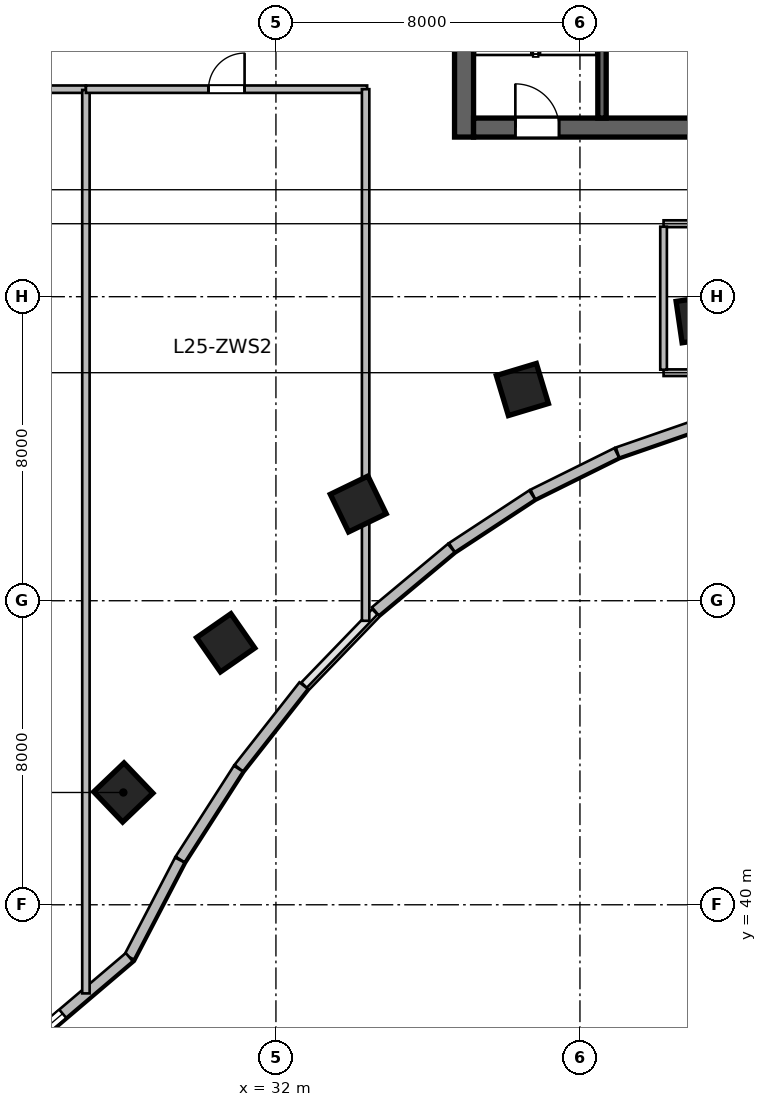
"""IFC4 building model, lengths in metres.
Left out: names, types, materials, properties, quantities, classifications, styles, units other than length and angle.
Written with IfcOpenShell. Run it as: python <this file> out.ifc"""

import sys

from ifc_helpers import new_model, si_unit, direction, frame, frame_2d, origin, origin_2d, place, context, subcontext, project, spatial, rectangle, extrude, source, transform, mapped, element, fill, save


model = new_model("IFC4")
c1 = context("Model", 3, precision=1e-05, world=origin(), true_north=direction((0.0, 1.0)))
c2 = subcontext(c1, "Body", "Model", "MODEL_VIEW")
j1 = project(units=[si_unit("LENGTHUNIT", "METRE"), si_unit("PLANEANGLEUNIT", "RADIAN")], contexts=[c1])
p1 = place(None, origin())
s1 = spatial("IfcSite", under=j1, at=p1, CompositionType="ELEMENT")
p2 = place(p1, origin())
s2 = spatial("IfcBuilding", under=s1, at=p2, CompositionType="ELEMENT")
p3 = place(p2, frame((0.0, 0.0, 107.7)))
s3 = spatial("IfcBuildingStorey", under=s2, at=p3, CompositionType="ELEMENT", Elevation=107.7)
m1 = source(origin(), c2, "Body", "SweptSolid", [
    extrude(rectangle(XDim=12.0, YDim=0.5, at=frame_2d((6.0, 0.0))), origin(), (0.0, 0.0, 1.0), 3.9),
])
p4 = place(p3, frame((36.95, 60.2, 0.0), z_axis=(0.0, 0.0, 1.0), x_axis=(0.0, 1.0, 0.0)))
e1 = element("IfcWall", 1, at=p4, inside=s3, PredefinedType="SHEAR", context=c2, shape_type="MappedRepresentation", body=[
    mapped(m1, transform((0.0, 0.0, 0.0), scale=1.0)),
])
m2 = source(origin(), c2, "Body", "SweptSolid", [
    extrude(rectangle(XDim=21.6, YDim=0.5, at=frame_2d((10.8, 0.0))), origin(), (0.0, 0.0, 1.0), 3.9),
])
p5 = place(p3, frame((37.2, 60.45, 0.0), z_axis=(0.0, 0.0, 1.0), x_axis=(1.0, 0.0, 0.0)))
e2 = element("IfcWall", 2, at=p5, inside=s3, PredefinedType="SHEAR", context=c2, shape_type="MappedRepresentation", body=[
    mapped(m2, transform((0.0, 0.0, 0.0), scale=1.0)),
])
p6 = place(p5, frame((1.1, 0.0, 0.0)))
e3 = element("IfcOpeningElement", 3, at=p6, cuts=e2, PredefinedType="OPENING", context=c2, shape_type="SweptSolid", body=[
    extrude(rectangle(XDim=1.15, YDim=2.15, at=frame_2d((0.575, 1.075))), frame((0.0, 0.26, 0.0), z_axis=(0.0, -1.0, 0.0), x_axis=(1.0, 0.0, 0.0)), (0.0, 0.0, 1.0), 0.52),
])
p7 = place(p5, frame((19.5, 0.0, 0.0)))
e4 = element("IfcOpeningElement", 4, at=p7, cuts=e2, PredefinedType="OPENING", context=c2, shape_type="SweptSolid", body=[
    extrude(rectangle(XDim=0.9, YDim=2.1, at=frame_2d((0.45, 1.05))), frame((0.0, 0.26, 0.0), z_axis=(0.0, -1.0, 0.0), x_axis=(1.0, 0.0, 0.0)), (0.0, 0.0, 1.0), 0.52),
])
p8 = place(p5, frame((12.02, 0.0, 0.0)))
e5 = element("IfcOpeningElement", 5, at=p8, cuts=e2, PredefinedType="OPENING", context=c2, shape_type="SweptSolid", body=[
    extrude(rectangle(XDim=1.6, YDim=2.15, at=frame_2d((0.8, 1.075))), frame((0.0, 0.26, 0.0), z_axis=(0.0, -1.0, 0.0), x_axis=(1.0, 0.0, 0.0)), (0.0, 0.0, 1.0), 0.52),
])
m3 = source(origin(), c2, "Body", "SweptSolid", [
    extrude(rectangle(XDim=11.0, YDim=0.22, at=frame_2d((5.5, 0.0))), origin(), (0.0, 0.0, 1.0), 3.9),
])
p9 = place(p3, frame((40.58, 60.7, 0.0), z_axis=(0.0, 0.0, 1.0), x_axis=(0.0, 1.0, 0.0)))
e6 = element("IfcWall", 6, at=p9, inside=s3, PredefinedType="SHEAR", context=c2, shape_type="MappedRepresentation", body=[
    mapped(m3, transform((0.0, 0.0, 0.0), scale=1.0)),
])
m4 = source(origin(), c2, "Body", "SweptSolid", [
    extrude(rectangle(XDim=1.1, YDim=1.1, at=origin_2d()), origin(), (0.0, 0.0, 1.0), 3.9),
])
for number, where, z_axis, x_axis in (
    (7, (27.985, 42.955, 0.0), (0.0, 0.0, 1.0), (-0.691, 0.723, 0.0)),
    (8, (30.677, 46.892, 0.0), (0.0, 0.0, 1.0), (-0.571, 0.821, 0.0)),
    (9, (34.166, 50.545, 0.0), (0.0, 0.0, 1.0), (-0.436, 0.9, 0.0)),
    (10, (38.485, 53.558, 0.0), (0.0, 0.0, 1.0), (-0.289, 0.957, 0.0)),
    (11, (43.154, 55.411, 0.0), (0.0, 0.0, 1.0), (-0.143, 0.99, 0.0)),
):
    element("IfcColumn", number, at=place(p3, frame(where, z_axis=z_axis, x_axis=x_axis)), inside=s3, PredefinedType="COLUMN", context=c2, shape_type="MappedRepresentation", body=[
        mapped(m4, transform((0.0, 0.0, 0.0), scale=1.0)),
    ])
m5 = source(origin(), c2, "Body", "SweptSolid", [
    extrude(rectangle(XDim=2.411, YDim=0.28, at=frame_2d((1.205, 0.0))), origin(), (0.0, 0.0, 1.0), 3.65),
])
p10 = place(p3, frame((43.266, 52.689, 0.0), z_axis=(0.0, 0.0, 1.0), x_axis=(-0.944880068161, -0.327416640982, 0.0)))
e12 = element("IfcWall", 12, at=p10, inside=s3, PredefinedType="SOLIDWALL", context=c2, shape_type="MappedRepresentation", body=[
    mapped(m5, transform((0.0, 0.0, 0.0), scale=1.0)),
])
m6 = source(origin(), c2, "Body", "SweptSolid", [
    extrude(rectangle(XDim=2.462, YDim=0.28, at=frame_2d((1.231, 0.0))), origin(), (0.0, 0.0, 1.0), 3.65),
])
p11 = place(p3, frame((40.967, 51.891, 0.0), z_axis=(0.0, 0.0, 1.0), x_axis=(-0.8959882207, -0.444077817917, 0.0)))
e13 = element("IfcWall", 13, at=p11, inside=s3, PredefinedType="SOLIDWALL", context=c2, shape_type="MappedRepresentation", body=[
    mapped(m6, transform((0.0, 0.0, 0.0), scale=1.0)),
])
m7 = source(origin(), c2, "Body", "SweptSolid", [
    extrude(rectangle(XDim=2.527, YDim=0.28, at=frame_2d((1.264, 0.0))), origin(), (0.0, 0.0, 1.0), 3.65),
])
p12 = place(p3, frame((38.742, 50.786, 0.0), z_axis=(0.0, 0.0, 1.0), x_axis=(-0.836011905051, -0.548711303523, 0.0)))
e14 = element("IfcWall", 14, at=p12, inside=s3, PredefinedType="SOLIDWALL", context=c2, shape_type="MappedRepresentation", body=[
    mapped(m7, transform((0.0, 0.0, 0.0), scale=1.0)),
])
m8 = source(origin(), c2, "Body", "SweptSolid", [
    extrude(rectangle(XDim=2.601, YDim=0.28, at=frame_2d((1.3, 0.0))), origin(), (0.0, 0.0, 1.0), 3.65),
])
p13 = place(p3, frame((36.613, 49.387, 0.0), z_axis=(0.0, 0.0, 1.0), x_axis=(-0.76796730295, -0.640489048775, 0.0)))
e15 = element("IfcWall", 15, at=p13, inside=s3, PredefinedType="SOLIDWALL", context=c2, shape_type="MappedRepresentation", body=[
    mapped(m8, transform((0.0, 0.0, 0.0), scale=1.0)),
])
m9 = source(origin(), c2, "Body", "SweptSolid", [
    extrude(rectangle(XDim=2.76, YDim=0.28, at=frame_2d((1.38, 0.0))), origin(), (0.0, 0.0, 1.0), 3.65),
])
p14 = place(p3, frame((32.728, 45.766, 0.0), z_axis=(0.0, 0.0, 1.0), x_axis=(-0.618180818641, -0.786035925047, 0.0)))
e16 = element("IfcWall", 16, at=p14, inside=s3, PredefinedType="SOLIDWALL", context=c2, shape_type="MappedRepresentation", body=[
    mapped(m9, transform((0.0, 0.0, 0.0), scale=1.0)),
])
m10 = source(origin(), c2, "Body", "SweptSolid", [
    extrude(rectangle(XDim=2.84, YDim=0.28, at=frame_2d((1.42, 0.0))), origin(), (0.0, 0.0, 1.0), 3.65),
])
p15 = place(p3, frame((31.011, 43.582, 0.0), z_axis=(0.0, 0.0, 1.0), x_axis=(-0.540214368057, -0.841527442538, 0.0)))
e17 = element("IfcWall", 17, at=p15, inside=s3, PredefinedType="SOLIDWALL", context=c2, shape_type="MappedRepresentation", body=[
    mapped(m10, transform((0.0, 0.0, 0.0), scale=1.0)),
])
m11 = source(origin(), c2, "Body", "SweptSolid", [
    extrude(rectangle(XDim=2.88, YDim=0.28, at=frame_2d((1.44, 0.0))), origin(), (0.0, 0.0, 1.0), 3.65),
])
p16 = place(p3, frame((29.469, 41.178, 0.0), z_axis=(0.0, 0.0, 1.0), x_axis=(-0.461769086658, -0.887000175088, 0.0)))
e18 = element("IfcWall", 18, at=p16, inside=s3, PredefinedType="SOLIDWALL", context=c2, shape_type="MappedRepresentation", body=[
    mapped(m11, transform((0.0, 0.0, 0.0), scale=1.0)),
])
m12 = source(origin(), c2, "Body", "SweptSolid", [
    extrude(rectangle(XDim=4.659, YDim=0.28, at=frame_2d((2.33, 0.0))), origin(), (0.0, 0.0, 1.0), 3.65),
])
p17 = place(p3, frame((28.139, 38.624, 0.0), z_axis=(0.0, 0.0, 1.0), x_axis=(-0.761913458795, -0.647678841176, 0.0)))
e19 = element("IfcWall", 19, at=p17, inside=s3, PredefinedType="SOLIDWALL", context=c2, shape_type="MappedRepresentation", body=[
    mapped(m12, transform((0.0, 0.0, 0.0), scale=1.0)),
])
p18 = place(p17, frame((2.299, 0.0, 0.95)))
e20 = element("IfcOpeningElement", 20, at=p18, cuts=e19, PredefinedType="OPENING", context=c2, shape_type="SweptSolid", body=[
    extrude(rectangle(XDim=2.2, YDim=2.1, at=frame_2d((1.1, 1.05))), frame((0.0, 0.15, 0.0), z_axis=(0.0, -1.0, 0.0), x_axis=(1.0, 0.0, 0.0)), (0.0, 0.0, 1.0), 0.3),
])
m13 = source(origin(), c2, "Body", "SweptSolid", [
    extrude(rectangle(XDim=4.176, YDim=0.175, at=frame_2d((2.088, 0.0))), origin(), (0.0, 0.0, 1.0), 3.65),
])
p19 = place(p3, frame((42.2, 54.0, 0.0), z_axis=(0.0, 0.0, 1.0), x_axis=(1.0, 0.0, 0.0)))
e21 = element("IfcWall", 21, at=p19, inside=s3, PredefinedType="PARTITIONING", context=c2, shape_type="MappedRepresentation", body=[
    mapped(m13, transform((0.0, 0.0, 0.0), scale=1.0)),
])
m14 = source(origin(), c2, "Body", "SweptSolid", [
    extrude(rectangle(XDim=4.176, YDim=0.18, at=frame_2d((2.088, 0.0))), origin(), (0.0, 0.0, 1.0), 3.65),
])
p20 = place(p3, frame((42.2, 57.92, 0.0), z_axis=(0.0, 0.0, 1.0), x_axis=(1.0, 0.0, 0.0)))
e22 = element("IfcWall", 22, at=p20, inside=s3, PredefinedType="PLUMBINGWALL", context=c2, shape_type="MappedRepresentation", body=[
    mapped(m14, transform((0.0, 0.0, 0.0), scale=1.0)),
])
p21 = place(p20, frame((1.638, 0.0, 0.0)))
e23 = element("IfcOpeningElement", 23, at=p21, cuts=e22, PredefinedType="OPENING", context=c2, shape_type="SweptSolid", body=[
    extrude(rectangle(XDim=0.9, YDim=2.08, at=frame_2d((0.45, 1.04))), frame((0.0, 0.1, 0.0), z_axis=(0.0, -1.0, 0.0), x_axis=(1.0, 0.0, 0.0)), (0.0, 0.0, 1.0), 0.2),
])
m15 = source(origin(), c2, "Body", "SweptSolid", [
    extrude(rectangle(XDim=3.763, YDim=0.175, at=frame_2d((1.881, 0.0))), origin(), (0.0, 0.0, 1.0), 3.65),
])
p22 = place(p3, frame((42.2, 54.079, 0.0), z_axis=(0.0, 0.0, 1.0), x_axis=(0.0, 1.0, 0.0)))
e24 = element("IfcWall", 24, at=p22, inside=s3, PredefinedType="PARTITIONING", context=c2, shape_type="MappedRepresentation", body=[
    mapped(m15, transform((0.0, 0.0, 0.0), scale=1.0)),
])
m16 = source(origin(), c2, "Body", "SweptSolid", [
    extrude(rectangle(XDim=3.82, YDim=0.195, at=frame_2d((1.91, 0.0))), origin(), (0.0, 0.0, 1.0), 3.65),
])
p23 = place(p3, frame((23.18, 61.46, 0.0), z_axis=(0.0, 0.0, 1.0), x_axis=(1.0, 0.0, 0.0)))
e25 = element("IfcWall", 25, at=p23, inside=s3, PredefinedType="PARTITIONING", context=c2, shape_type="MappedRepresentation", body=[
    mapped(m16, transform((0.0, 0.0, 0.0), scale=1.0)),
])
p24 = place(p23, frame((1.435, 0.0, 0.0)))
e26 = element("IfcOpeningElement", 26, at=p24, cuts=e25, PredefinedType="OPENING", context=c2, shape_type="SweptSolid", body=[
    extrude(rectangle(XDim=0.95, YDim=2.1, at=frame_2d((0.475, 1.05))), frame((0.0, 0.107, 0.0), z_axis=(0.0, -1.0, 0.0), x_axis=(1.0, 0.0, 0.0)), (0.0, 0.0, 1.0), 0.215),
])
m17 = source(origin(), c2, "Body", "SweptSolid", [
    extrude(rectangle(XDim=23.771, YDim=0.195, at=frame_2d((11.886, 0.0))), origin(), (0.0, 0.0, 1.0), 2.942),
])
p25 = place(p3, frame((27.0, 37.668, 0.0), z_axis=(0.0, 0.0, 1.0), x_axis=(0.0, 1.0, 0.0)))
e27 = element("IfcWall", 27, at=p25, inside=s3, PredefinedType="PARTITIONING", context=c2, shape_type="MappedRepresentation", body=[
    mapped(m17, transform((0.0, 0.0, 0.0), scale=1.0)),
])
m18 = source(origin(), c2, "Body", "SweptSolid", [
    extrude(rectangle(XDim=7.4, YDim=0.195, at=frame_2d((3.7, 0.0))), origin(), (0.0, 0.0, 1.0), 3.65),
])
p26 = place(p3, frame((27.0, 61.46, 0.0), z_axis=(0.0, 0.0, 1.0), x_axis=(1.0, 0.0, 0.0)))
e28 = element("IfcWall", 28, at=p26, inside=s3, PredefinedType="PARTITIONING", context=c2, shape_type="MappedRepresentation", body=[
    mapped(m18, transform((0.0, 0.0, 0.0), scale=1.0)),
])
p27 = place(p26, frame((3.225, 0.0, 0.0)))
e29 = element("IfcOpeningElement", 29, at=p27, cuts=e28, PredefinedType="OPENING", context=c2, shape_type="SweptSolid", body=[
    extrude(rectangle(XDim=0.95, YDim=2.1, at=frame_2d((0.475, 1.05))), frame((0.0, 0.107, 0.0), z_axis=(0.0, -1.0, 0.0), x_axis=(1.0, 0.0, 0.0)), (0.0, 0.0, 1.0), 0.215),
])
m19 = source(origin(), c2, "Body", "SweptSolid", [
    extrude(rectangle(XDim=13.988, YDim=0.195, at=frame_2d((6.994, 0.0))), origin(), (0.0, 0.0, 1.0), 3.65),
])
p28 = place(p3, frame((34.36, 47.472, 0.0), z_axis=(0.0, 0.0, 1.0), x_axis=(0.0, 1.0, 0.0)))
e30 = element("IfcWall", 30, at=p28, inside=s3, PredefinedType="PARTITIONING", context=c2, shape_type="MappedRepresentation", body=[
    mapped(m19, transform((0.0, 0.0, 0.0), scale=1.0)),
])
m20 = source(origin(), c2, "Body", "SweptSolid", [
    extrude(rectangle(XDim=2.2, YDim=2.1, at=frame_2d((1.1, 1.05))), frame((0.0, 0.03, 0.0), z_axis=(0.0, -1.0, 0.0), x_axis=(1.0, 0.0, 0.0)), (0.0, 0.0, 1.0), 0.06),
])
p29 = place(p18, origin())
e31 = element("IfcWindow", 31, at=p29, inside=s3, PartitioningType="TRIPLE_PANEL_VERTICAL", PredefinedType="WINDOW", context=c2, shape_type="MappedRepresentation", body=[
    mapped(m20, transform((0.0, 0.0, 0.0), scale=1.0)),
])
fill(e20, e31)
m21 = source(origin(), c2, "Body", "SweptSolid", [
    extrude(rectangle(XDim=1.15, YDim=2.15, at=frame_2d((0.575, 1.075))), frame((0.0, 0.025, 0.0), z_axis=(0.0, -1.0, 0.0), x_axis=(1.0, 0.0, 0.0)), (0.0, 0.0, 1.0), 0.05),
])
p30 = place(p6, origin())
e32 = element("IfcDoor", 32, at=p30, inside=s3, OperationType="SINGLE_SWING_LEFT", PredefinedType="DOOR", context=c2, shape_type="MappedRepresentation", body=[
    mapped(m21, transform((0.0, 0.0, 0.0), scale=1.0)),
])
fill(e3, e32)
m22 = source(origin(), c2, "Body", "SweptSolid", [
    extrude(rectangle(XDim=0.95, YDim=2.1, at=frame_2d((0.475, 1.05))), frame((0.0, 0.025, 0.0), z_axis=(0.0, -1.0, 0.0), x_axis=(1.0, 0.0, 0.0)), (0.0, 0.0, 1.0), 0.05),
])
p31 = place(p27, origin())
e33 = element("IfcDoor", 33, at=p31, inside=s3, OperationType="SINGLE_SWING_RIGHT", PredefinedType="DOOR", context=c2, shape_type="MappedRepresentation", body=[
    mapped(m22, transform((0.0, 0.0, 0.0), scale=1.0)),
])
fill(e29, e33)
save(model, sys.argv[1])
